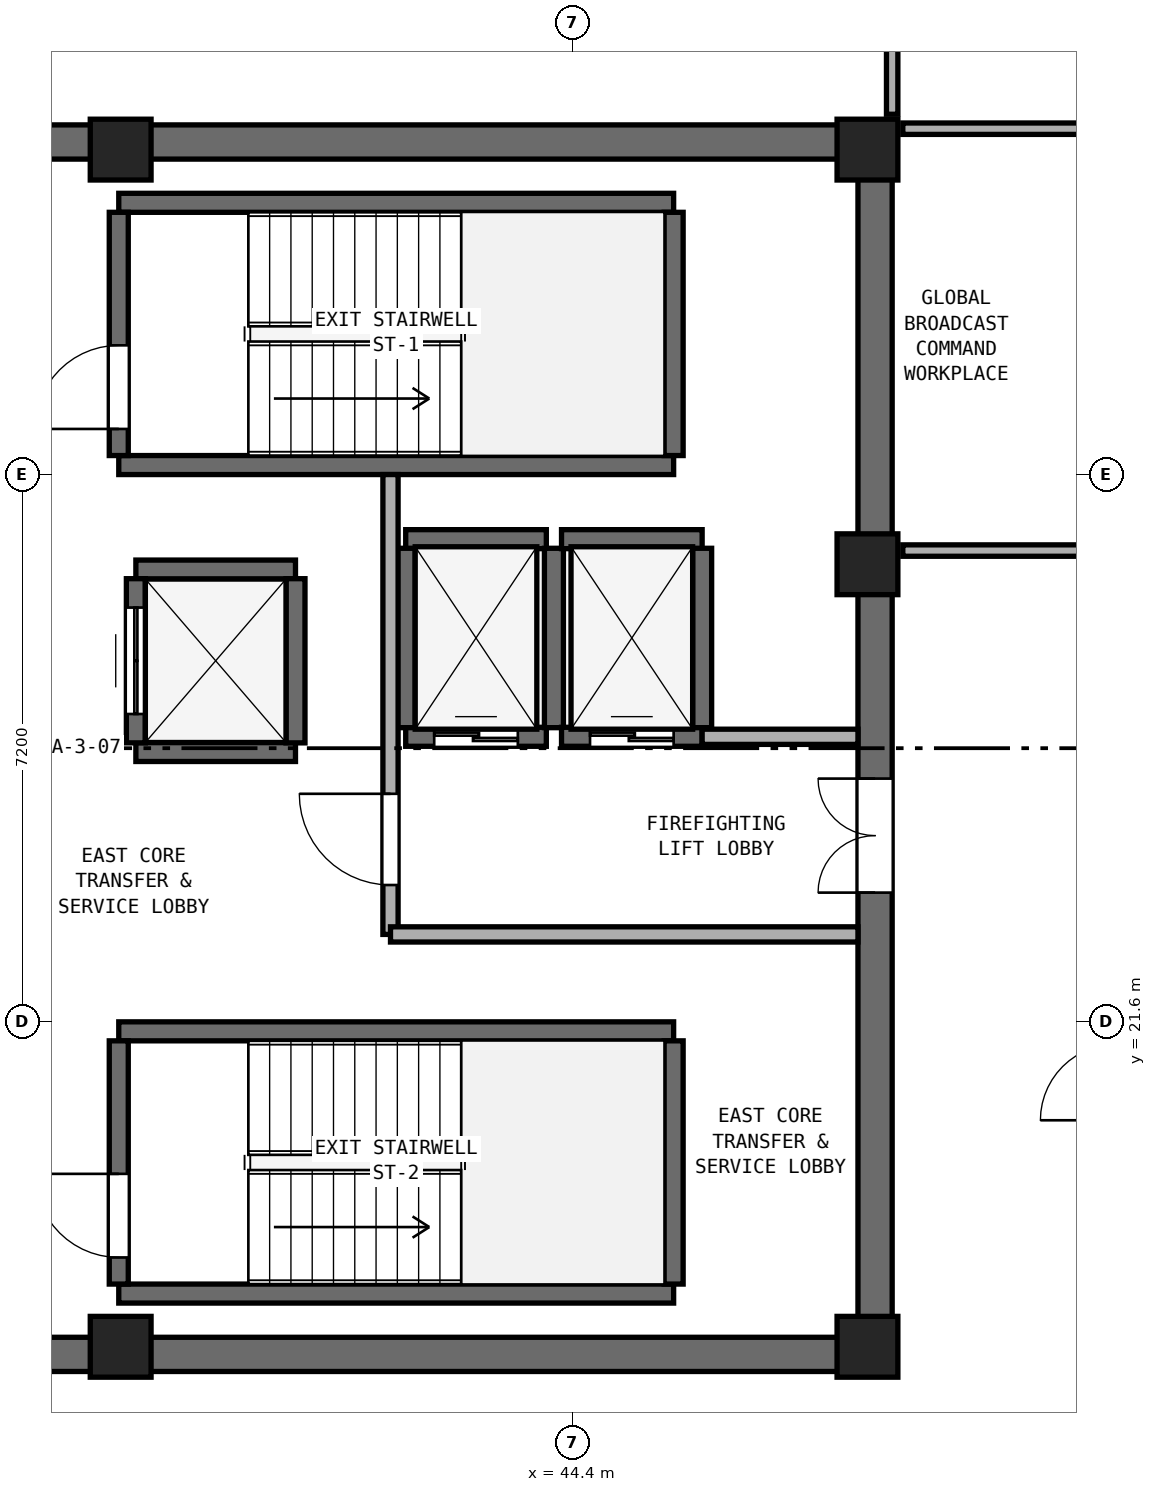
"""IFC4 building model, lengths in metres.
Left out: names, types, materials, properties, quantities, classifications, styles, units other than length and angle.
Written with IfcOpenShell. Run it as: python <this file> out.ifc"""

import sys

from ifc_helpers import new_model, si_unit, direction, frame, frame_2d, origin, origin_2d, place, context, subcontext, project, spatial, rectangle, extrude, element, fill, save


model = new_model("IFC4")
c1 = context("Model", 3, precision=1e-05, world=origin(), true_north=direction((0.0, 1.0)))
c2 = subcontext(c1, "Body", "Model", "MODEL_VIEW")
j1 = project(units=[si_unit("LENGTHUNIT", "METRE"), si_unit("PLANEANGLEUNIT", "RADIAN")], contexts=[c1])
p1 = place(None, origin())
s1 = spatial("IfcSite", under=j1, at=p1, CompositionType="ELEMENT")
p2 = place(p1, origin())
s2 = spatial("IfcBuilding", under=s1, at=p2, CompositionType="ELEMENT")
p3 = place(p2, frame((0.0, 0.0, 251.6)))
s3 = spatial("IfcBuildingStorey", under=s2, at=p3, CompositionType="ELEMENT", Elevation=251.6)
for number, where, z_axis, x_axis in (
    (1, (25.4, 17.225, 0.0), (0.0, 0.0, 1.0), (1.0, 0.0, 0.0)),
    (2, (25.4, 33.175, 0.0), (0.0, 0.0, 1.0), (1.0, 0.0, 0.0)),
):
    element("IfcWall", number, at=place(p3, frame(where, z_axis=z_axis, x_axis=x_axis)), inside=s3, PredefinedType="SHEAR", context=c2, shape_type="SweptSolid", body=[
        extrude(rectangle(XDim=23.2, YDim=0.45, at=frame_2d((11.6, 0.0))), origin(), (0.0, 0.0, 1.0), 3.51),
    ])
p4 = place(p3, frame((48.375, 17.45, 0.0), z_axis=(0.0, 0.0, 1.0), x_axis=(0.0, 1.0, 0.0)))
e3 = element("IfcWall", 3, at=p4, inside=s3, PredefinedType="SHEAR", context=c2, shape_type="SweptSolid", body=[
    extrude(rectangle(XDim=15.5, YDim=0.45, at=frame_2d((7.75, 0.0))), origin(), (0.0, 0.0, 1.0), 3.51),
])
p5 = place(p4, frame((5.85, 0.0, 0.0)))
e4 = element("IfcOpeningElement", 4, at=p5, cuts=e3, PredefinedType="OPENING", context=c2, shape_type="SweptSolid", body=[
    extrude(rectangle(XDim=1.5, YDim=2.15, at=frame_2d((0.75, 1.075))), frame((0.0, 0.235, 0.0), z_axis=(0.0, -1.0, 0.0), x_axis=(1.0, 0.0, 0.0)), (0.0, 0.0, 1.0), 0.47),
])
for number, where, z_axis, x_axis in (
    (5, (38.45, 17.325, 0.0), (0.0, 0.0, 1.0), (1.0, 0.0, 0.0)),
    (6, (48.275, 17.325, 0.0), (0.0, 0.0, 1.0), (1.0, 0.0, 0.0)),
    (7, (48.275, 27.62, 0.0), (0.0, 0.0, 1.0), (1.0, 0.0, 0.0)),
    (8, (48.275, 33.075, 0.0), (0.0, 0.0, 1.0), (1.0, 0.0, 0.0)),
    (9, (38.45, 33.075, 0.0), (0.0, 0.0, 1.0), (1.0, 0.0, 0.0)),
):
    element("IfcColumn", number, at=place(p3, frame(where, z_axis=z_axis, x_axis=x_axis)), inside=s3, PredefinedType="PILASTER", context=c2, shape_type="SweptSolid", body=[
        extrude(rectangle(XDim=0.8, YDim=0.8, at=origin_2d()), origin(), (0.0, 0.0, 1.0), 3.8),
    ])
for number, where, z_axis, x_axis in (
    (10, (38.425, 28.925, 0.0), (0.0, 0.0, 1.0), (1.0, 0.0, 0.0)),
    (11, (38.425, 32.375, 0.0), (0.0, 0.0, 1.0), (1.0, 0.0, 0.0)),
):
    element("IfcWall", number, at=place(p3, frame(where, z_axis=z_axis, x_axis=x_axis)), inside=s3, PredefinedType="SHEAR", context=c2, shape_type="SweptSolid", body=[
        extrude(rectangle(XDim=7.3, YDim=0.25, at=frame_2d((3.65, 0.0))), origin(), (0.0, 0.0, 1.0), 3.51),
    ])
p6 = place(p3, frame((38.425, 29.05, 0.0), z_axis=(0.0, 0.0, 1.0), x_axis=(0.0, 1.0, 0.0)))
e12 = element("IfcWall", 12, at=p6, inside=s3, PredefinedType="SHEAR", context=c2, shape_type="SweptSolid", body=[
    extrude(rectangle(XDim=3.2, YDim=0.25, at=frame_2d((1.6, 0.0))), origin(), (0.0, 0.0, 1.0), 3.51),
])
p7 = place(p6, frame((0.35, 0.0, 0.0)))
e13 = element("IfcOpeningElement", 13, at=p7, cuts=e12, PredefinedType="OPENING", context=c2, shape_type="SweptSolid", body=[
    extrude(rectangle(XDim=1.1, YDim=2.15, at=frame_2d((0.55, 1.075))), frame((0.0, 0.135, 0.0), z_axis=(0.0, -1.0, 0.0), x_axis=(1.0, 0.0, 0.0)), (0.0, 0.0, 1.0), 0.27),
])
p8 = place(p3, frame((45.725, 29.05, 0.0), z_axis=(0.0, 0.0, 1.0), x_axis=(0.0, 1.0, 0.0)))
e14 = element("IfcWall", 14, at=p8, inside=s3, PredefinedType="SHEAR", context=c2, shape_type="SweptSolid", body=[
    extrude(rectangle(XDim=3.2, YDim=0.25, at=frame_2d((1.6, 0.0))), origin(), (0.0, 0.0, 1.0), 3.51),
])
for number, where, z_axis, x_axis in (
    (15, (38.425, 18.025, 0.0), (0.0, 0.0, 1.0), (1.0, 0.0, 0.0)),
    (16, (38.425, 21.475, 0.0), (0.0, 0.0, 1.0), (1.0, 0.0, 0.0)),
):
    element("IfcWall", number, at=place(p3, frame(where, z_axis=z_axis, x_axis=x_axis)), inside=s3, PredefinedType="SHEAR", context=c2, shape_type="SweptSolid", body=[
        extrude(rectangle(XDim=7.3, YDim=0.25, at=frame_2d((3.65, 0.0))), origin(), (0.0, 0.0, 1.0), 3.51),
    ])
p9 = place(p3, frame((38.425, 18.15, 0.0), z_axis=(0.0, 0.0, 1.0), x_axis=(0.0, 1.0, 0.0)))
e17 = element("IfcWall", 17, at=p9, inside=s3, PredefinedType="SHEAR", context=c2, shape_type="SweptSolid", body=[
    extrude(rectangle(XDim=3.2, YDim=0.25, at=frame_2d((1.6, 0.0))), origin(), (0.0, 0.0, 1.0), 3.51),
])
p10 = place(p9, frame((0.35, 0.0, 0.0)))
e18 = element("IfcOpeningElement", 18, at=p10, cuts=e17, PredefinedType="OPENING", context=c2, shape_type="SweptSolid", body=[
    extrude(rectangle(XDim=1.1, YDim=2.15, at=frame_2d((0.55, 1.075))), frame((0.0, 0.135, 0.0), z_axis=(0.0, -1.0, 0.0), x_axis=(1.0, 0.0, 0.0)), (0.0, 0.0, 1.0), 0.27),
])
p11 = place(p3, frame((45.725, 18.15, 0.0), z_axis=(0.0, 0.0, 1.0), x_axis=(0.0, 1.0, 0.0)))
e19 = element("IfcWall", 19, at=p11, inside=s3, PredefinedType="SHEAR", context=c2, shape_type="SweptSolid", body=[
    extrude(rectangle(XDim=3.2, YDim=0.25, at=frame_2d((1.6, 0.0))), origin(), (0.0, 0.0, 1.0), 3.51),
])
p12 = place(p3, frame((42.2, 25.35, 0.0), z_axis=(0.0, 0.0, 1.0), x_axis=(1.0, 0.0, 0.0)))
e20 = element("IfcWall", 20, at=p12, inside=s3, PredefinedType="SHEAR", context=c2, shape_type="SweptSolid", body=[
    extrude(rectangle(XDim=1.85, YDim=0.25, at=frame_2d((0.925, 0.0))), origin(), (0.0, 0.0, 1.0), 3.51),
])
p13 = place(p12, frame((0.375, 0.0, 0.0)))
e21 = element("IfcOpeningElement", 21, at=p13, cuts=e20, PredefinedType="OPENING", context=c2, shape_type="SweptSolid", body=[
    extrude(rectangle(XDim=1.1, YDim=2.15, at=frame_2d((0.55, 1.075))), frame((0.0, 0.135, 0.0), z_axis=(0.0, -1.0, 0.0), x_axis=(1.0, 0.0, 0.0)), (0.0, 0.0, 1.0), 0.27),
])
p14 = place(p3, frame((42.2, 27.95, 0.0), z_axis=(0.0, 0.0, 1.0), x_axis=(1.0, 0.0, 0.0)))
e22 = element("IfcWall", 22, at=p14, inside=s3, PredefinedType="SHEAR", context=c2, shape_type="SweptSolid", body=[
    extrude(rectangle(XDim=1.85, YDim=0.25, at=frame_2d((0.925, 0.0))), origin(), (0.0, 0.0, 1.0), 3.51),
])
for number, where, z_axis, x_axis in (
    (23, (42.2, 25.47, 0.0), (0.0, 0.0, 1.0), (0.0, 1.0, 0.0)),
    (24, (44.15, 25.47, 0.0), (0.0, 0.0, 1.0), (0.0, 1.0, 0.0)),
):
    element("IfcWall", number, at=place(p3, frame(where, z_axis=z_axis, x_axis=x_axis)), inside=s3, PredefinedType="SHEAR", context=c2, shape_type="SweptSolid", body=[
        extrude(rectangle(XDim=2.36, YDim=0.25, at=frame_2d((1.18, 0.0))), origin(), (0.0, 0.0, 1.0), 3.51),
    ])
p15 = place(p3, frame((44.25, 25.35, 0.0), z_axis=(0.0, 0.0, 1.0), x_axis=(1.0, 0.0, 0.0)))
e25 = element("IfcWall", 25, at=p15, inside=s3, PredefinedType="SHEAR", context=c2, shape_type="SweptSolid", body=[
    extrude(rectangle(XDim=1.85, YDim=0.25, at=frame_2d((0.925, 0.0))), origin(), (0.0, 0.0, 1.0), 3.51),
])
p16 = place(p15, frame((0.375, 0.0, 0.0)))
e26 = element("IfcOpeningElement", 26, at=p16, cuts=e25, PredefinedType="OPENING", context=c2, shape_type="SweptSolid", body=[
    extrude(rectangle(XDim=1.1, YDim=2.15, at=frame_2d((0.55, 1.075))), frame((0.0, 0.135, 0.0), z_axis=(0.0, -1.0, 0.0), x_axis=(1.0, 0.0, 0.0)), (0.0, 0.0, 1.0), 0.27),
])
p17 = place(p3, frame((44.25, 27.95, 0.0), z_axis=(0.0, 0.0, 1.0), x_axis=(1.0, 0.0, 0.0)))
e27 = element("IfcWall", 27, at=p17, inside=s3, PredefinedType="SHEAR", context=c2, shape_type="SweptSolid", body=[
    extrude(rectangle(XDim=1.85, YDim=0.25, at=frame_2d((0.925, 0.0))), origin(), (0.0, 0.0, 1.0), 3.51),
])
p18 = place(p3, frame((46.1, 25.47, 0.0), z_axis=(0.0, 0.0, 1.0), x_axis=(0.0, 1.0, 0.0)))
e28 = element("IfcWall", 28, at=p18, inside=s3, PredefinedType="SHEAR", context=c2, shape_type="SweptSolid", body=[
    extrude(rectangle(XDim=2.36, YDim=0.25, at=frame_2d((1.18, 0.0))), origin(), (0.0, 0.0, 1.0), 3.51),
])
for number, where, z_axis, x_axis in (
    (29, (38.65, 25.15, 0.0), (0.0, 0.0, 1.0), (1.0, 0.0, 0.0)),
    (30, (38.65, 27.55, 0.0), (0.0, 0.0, 1.0), (1.0, 0.0, 0.0)),
):
    element("IfcWall", number, at=place(p3, frame(where, z_axis=z_axis, x_axis=x_axis)), inside=s3, PredefinedType="SHEAR", context=c2, shape_type="SweptSolid", body=[
        extrude(rectangle(XDim=2.1, YDim=0.25, at=frame_2d((1.05, 0.0))), origin(), (0.0, 0.0, 1.0), 3.51),
    ])
p19 = place(p3, frame((38.65, 25.27, 0.0), z_axis=(0.0, 0.0, 1.0), x_axis=(0.0, 1.0, 0.0)))
e31 = element("IfcWall", 31, at=p19, inside=s3, PredefinedType="SHEAR", context=c2, shape_type="SweptSolid", body=[
    extrude(rectangle(XDim=2.16, YDim=0.25, at=frame_2d((1.08, 0.0))), origin(), (0.0, 0.0, 1.0), 3.51),
])
p20 = place(p19, frame((0.38, 0.0, 0.0)))
e32 = element("IfcOpeningElement", 32, at=p20, cuts=e31, PredefinedType="OPENING", context=c2, shape_type="SweptSolid", body=[
    extrude(rectangle(XDim=1.4, YDim=2.2, at=frame_2d((0.7, 1.1))), frame((0.0, 0.135, 0.0), z_axis=(0.0, -1.0, 0.0), x_axis=(1.0, 0.0, 0.0)), (0.0, 0.0, 1.0), 0.27),
])
p21 = place(p3, frame((40.75, 25.27, 0.0), z_axis=(0.0, 0.0, 1.0), x_axis=(0.0, 1.0, 0.0)))
e33 = element("IfcWall", 33, at=p21, inside=s3, PredefinedType="SHEAR", context=c2, shape_type="SweptSolid", body=[
    extrude(rectangle(XDim=2.16, YDim=0.25, at=frame_2d((1.08, 0.0))), origin(), (0.0, 0.0, 1.0), 3.51),
])
p22 = place(p3, frame((42.0, 22.75, 0.0), z_axis=(0.0, 0.0, 1.0), x_axis=(0.0, 1.0, 0.0)))
e34 = element("IfcWall", 34, at=p22, inside=s3, PredefinedType="SOLIDWALL", context=c2, shape_type="SweptSolid", body=[
    extrude(rectangle(XDim=6.05, YDim=0.2, at=frame_2d((3.025, 0.0))), origin(), (0.0, 0.0, 1.0), 3.51),
])
p23 = place(p22, frame((0.65, 0.0, 0.0)))
e35 = element("IfcOpeningElement", 35, at=p23, cuts=e34, PredefinedType="OPENING", context=c2, shape_type="SweptSolid", body=[
    extrude(rectangle(XDim=1.2, YDim=2.15, at=frame_2d((0.6, 1.075))), frame((0.0, 0.11, 0.0), z_axis=(0.0, -1.0, 0.0), x_axis=(1.0, 0.0, 0.0)), (0.0, 0.0, 1.0), 0.22),
])
p24 = place(p3, frame((42.0, 22.75, 0.0), z_axis=(0.0, 0.0, 1.0), x_axis=(1.0, 0.0, 0.0)))
e36 = element("IfcWall", 36, at=p24, inside=s3, PredefinedType="SOLIDWALL", context=c2, shape_type="SweptSolid", body=[
    extrude(rectangle(XDim=6.15, YDim=0.2, at=frame_2d((3.075, 0.0))), origin(), (0.0, 0.0, 1.0), 3.51),
])
p25 = place(p3, frame((46.1, 25.35, 0.0), z_axis=(0.0, 0.0, 1.0), x_axis=(1.0, 0.0, 0.0)))
e37 = element("IfcWall", 37, at=p25, inside=s3, PredefinedType="SOLIDWALL", context=c2, shape_type="SweptSolid", body=[
    extrude(rectangle(XDim=2.05, YDim=0.2, at=frame_2d((1.025, 0.0))), origin(), (0.0, 0.0, 1.0), 3.51),
])
p26 = place(p3, frame((48.6, 33.54, 0.0), z_axis=(0.0, 0.0, 1.0), x_axis=(0.0, 1.0, 0.0)))
e38 = element("IfcWall", 38, at=p26, inside=s3, PredefinedType="PARTITIONING", context=c2, shape_type="SweptSolid", body=[
    extrude(rectangle(XDim=2.81, YDim=0.15, at=frame_2d((1.405, 0.0))), origin(), (0.0, 0.0, 1.0), 2.893),
])
p27 = place(p3, frame((48.74, 27.8, 0.0), z_axis=(0.0, 0.0, 1.0), x_axis=(1.0, 0.0, 0.0)))
e39 = element("IfcWall", 39, at=p27, inside=s3, PredefinedType="PARTITIONING", context=c2, shape_type="SweptSolid", body=[
    extrude(rectangle(XDim=2.81, YDim=0.15, at=frame_2d((1.405, 0.0))), origin(), (0.0, 0.0, 1.0), 3.51),
])
p28 = place(p3, frame((48.74, 33.35, 0.0), z_axis=(0.0, 0.0, 1.0), x_axis=(1.0, 0.0, 0.0)))
e40 = element("IfcWall", 40, at=p28, inside=s3, PredefinedType="PARTITIONING", context=c2, shape_type="SweptSolid", body=[
    extrude(rectangle(XDim=2.81, YDim=0.15, at=frame_2d((1.405, 0.0))), origin(), (0.0, 0.0, 1.0), 2.893),
])
p29 = place(p7, origin())
e41 = element("IfcDoor", 41, at=p29, inside=s3, OperationType="SINGLE_SWING_LEFT", PredefinedType="DOOR", context=c2, shape_type="SweptSolid", body=[
    extrude(rectangle(XDim=1.1, YDim=2.15, at=frame_2d((0.55, 1.075))), frame((0.0, 0.025, 0.0), z_axis=(0.0, -1.0, 0.0), x_axis=(1.0, 0.0, 0.0)), (0.0, 0.0, 1.0), 0.05),
])
fill(e13, e41)
p30 = place(p10, origin())
e42 = element("IfcDoor", 42, at=p30, inside=s3, OperationType="SINGLE_SWING_RIGHT", PredefinedType="DOOR", context=c2, shape_type="SweptSolid", body=[
    extrude(rectangle(XDim=1.1, YDim=2.15, at=frame_2d((0.55, 1.075))), frame((0.0, 0.025, 0.0), z_axis=(0.0, -1.0, 0.0), x_axis=(1.0, 0.0, 0.0)), (0.0, 0.0, 1.0), 0.05),
])
fill(e18, e42)
p31 = place(p13, origin())
e43 = element("IfcDoor", 43, at=p31, inside=s3, OperationType="DOUBLE_DOOR_SLIDING", PredefinedType="DOOR", context=c2, shape_type="SweptSolid", body=[
    extrude(rectangle(XDim=1.1, YDim=2.15, at=frame_2d((0.55, 1.075))), frame((0.0, 0.025, 0.0), z_axis=(0.0, -1.0, 0.0), x_axis=(1.0, 0.0, 0.0)), (0.0, 0.0, 1.0), 0.05),
])
fill(e21, e43)
p32 = place(p16, origin())
e44 = element("IfcDoor", 44, at=p32, inside=s3, OperationType="DOUBLE_DOOR_SLIDING", PredefinedType="DOOR", context=c2, shape_type="SweptSolid", body=[
    extrude(rectangle(XDim=1.1, YDim=2.15, at=frame_2d((0.55, 1.075))), frame((0.0, 0.025, 0.0), z_axis=(0.0, -1.0, 0.0), x_axis=(1.0, 0.0, 0.0)), (0.0, 0.0, 1.0), 0.05),
])
fill(e26, e44)
p33 = place(p20, origin())
e45 = element("IfcDoor", 45, at=p33, inside=s3, OperationType="DOUBLE_DOOR_SLIDING", PredefinedType="DOOR", context=c2, shape_type="SweptSolid", body=[
    extrude(rectangle(XDim=1.4, YDim=2.2, at=frame_2d((0.7, 1.1))), frame((0.0, 0.025, 0.0), z_axis=(0.0, -1.0, 0.0), x_axis=(1.0, 0.0, 0.0)), (0.0, 0.0, 1.0), 0.05),
])
fill(e32, e45)
p34 = place(p23, origin())
e46 = element("IfcDoor", 46, at=p34, inside=s3, OperationType="SINGLE_SWING_RIGHT", PredefinedType="DOOR", context=c2, shape_type="SweptSolid", body=[
    extrude(rectangle(XDim=1.2, YDim=2.15, at=frame_2d((0.6, 1.075))), frame((0.0, 0.025, 0.0), z_axis=(0.0, -1.0, 0.0), x_axis=(1.0, 0.0, 0.0)), (0.0, 0.0, 1.0), 0.05),
])
fill(e35, e46)
p35 = place(p5, origin())
e47 = element("IfcDoor", 47, at=p35, inside=s3, OperationType="DOUBLE_DOOR_SINGLE_SWING", PredefinedType="DOOR", context=c2, shape_type="SweptSolid", body=[
    extrude(rectangle(XDim=1.5, YDim=2.15, at=frame_2d((0.75, 1.075))), frame((0.0, 0.025, 0.0), z_axis=(0.0, -1.0, 0.0), x_axis=(1.0, 0.0, 0.0)), (0.0, 0.0, 1.0), 0.05),
])
fill(e4, e47)
save(model, sys.argv[1])
